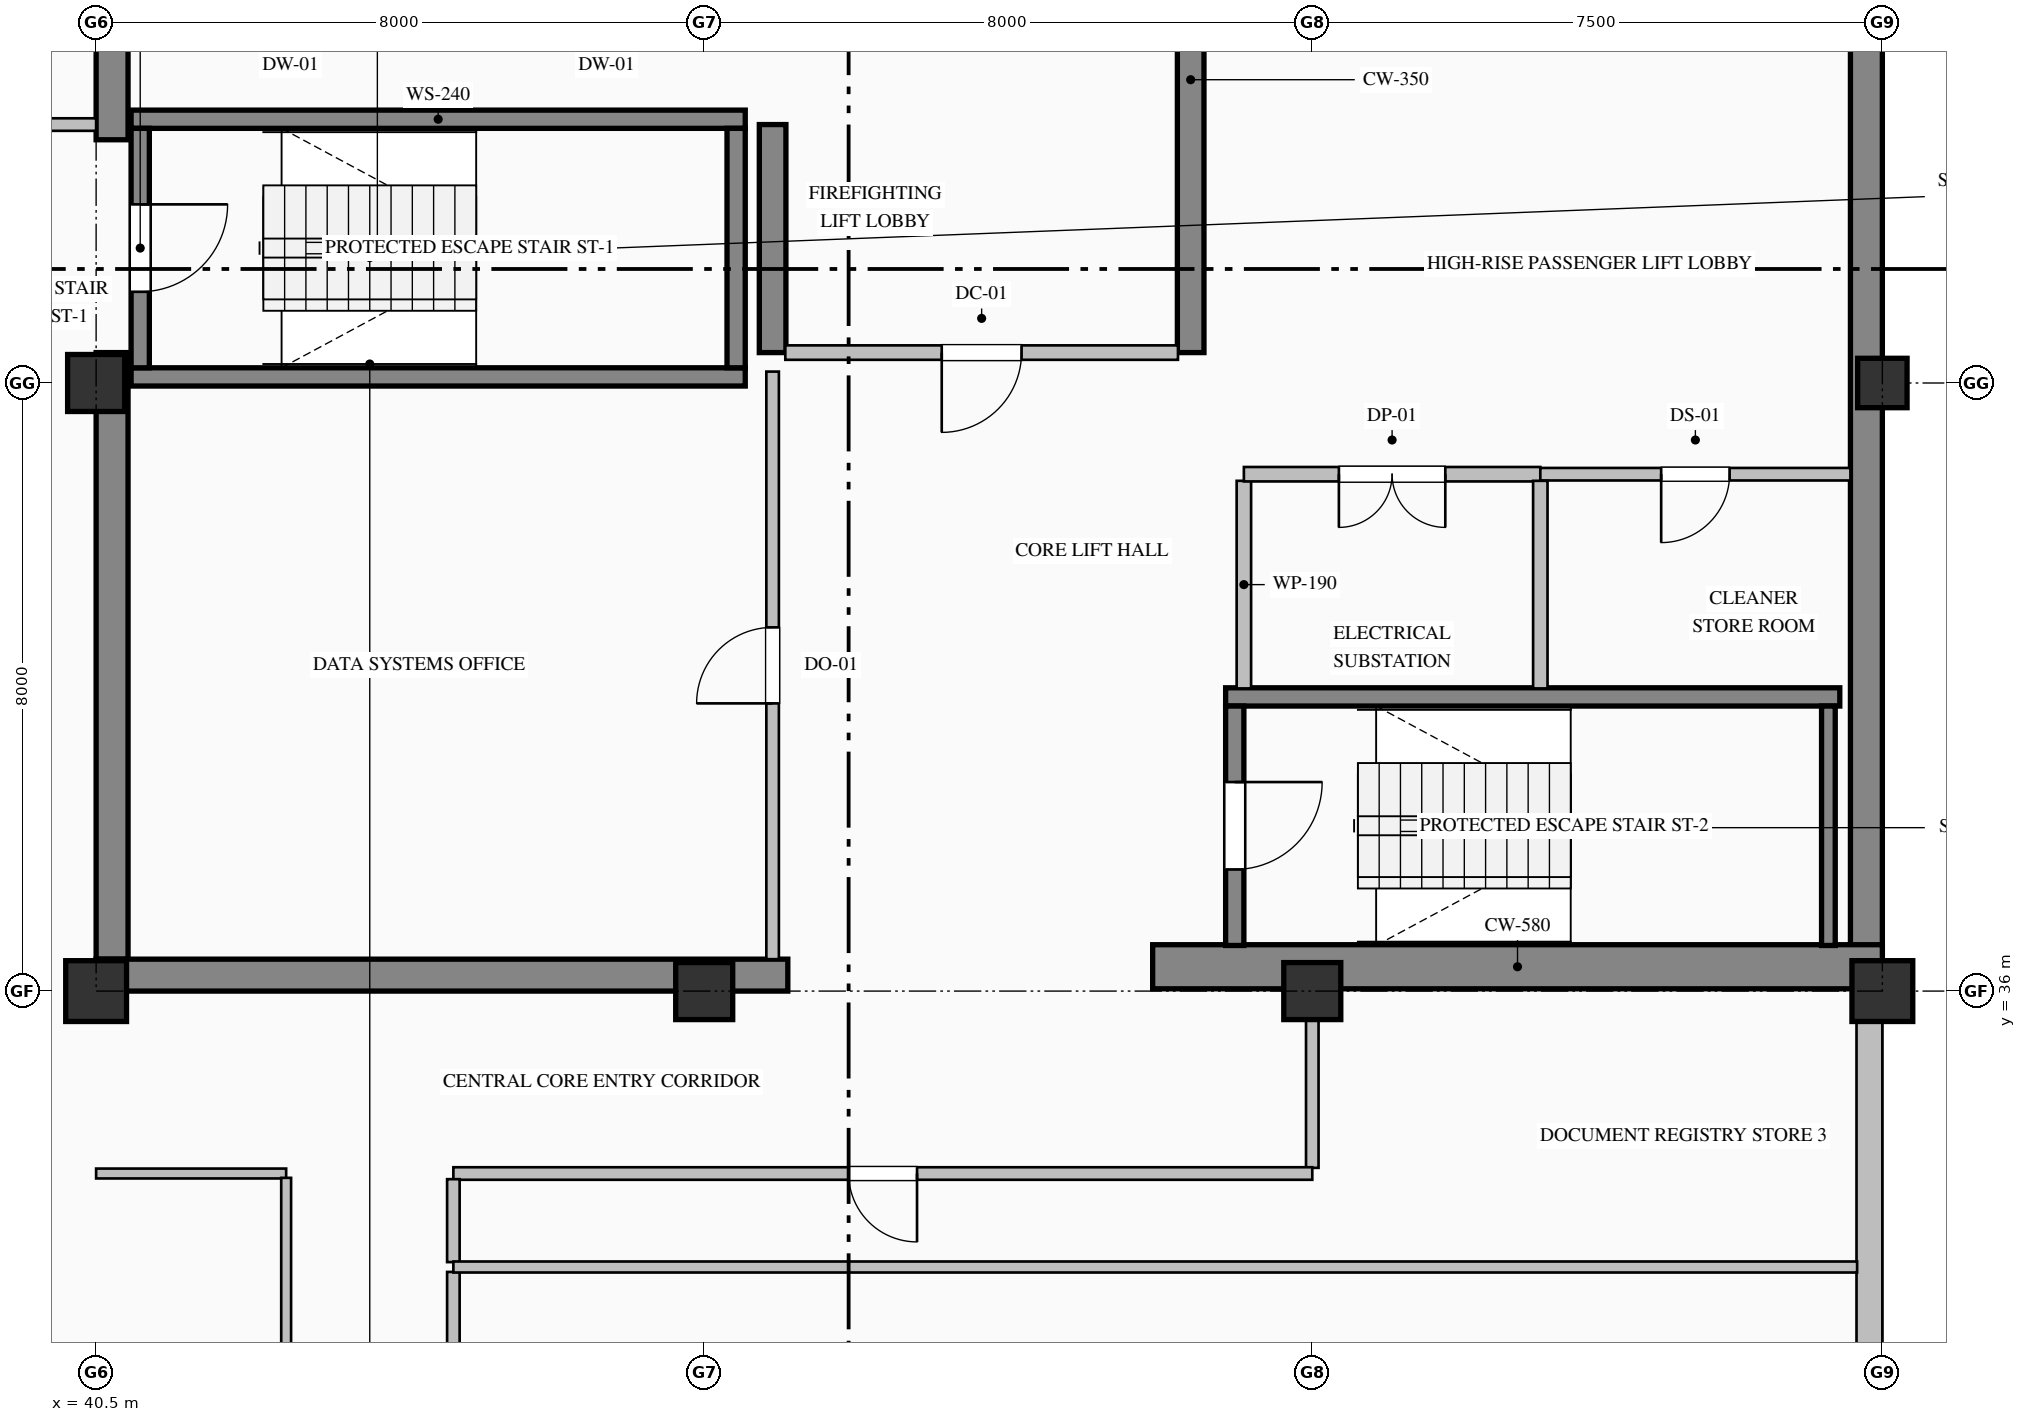
"""IFC4 building model, lengths in metres.
Left out: names, types, materials, properties, quantities, classifications, styles, units other than length and angle.
Written with IfcOpenShell. Run it as: python <this file> out.ifc"""

import sys

from ifc_helpers import new_model, si_unit, direction, frame, frame_2d, origin, origin_2d, place, context, subcontext, project, spatial, rectangle, hollow_rectangle, extrude, element, fill, save


model = new_model("IFC4")
c1 = context("Model", 3, precision=1e-05, world=origin(), true_north=direction((0.0, 1.0)))
c2 = subcontext(c1, "Body", "Model", "MODEL_VIEW")
j1 = project(units=[si_unit("LENGTHUNIT", "METRE"), si_unit("PLANEANGLEUNIT", "RADIAN")], contexts=[c1])
p1 = place(None, origin())
s1 = spatial("IfcSite", under=j1, at=p1, CompositionType="ELEMENT")
p2 = place(p1, origin())
s2 = spatial("IfcBuilding", under=s1, at=p2, CompositionType="ELEMENT")
p3 = place(p2, frame((0.0, 0.0, 363.2)))
s3 = spatial("IfcBuildingStorey", under=s2, at=p3, CompositionType="ELEMENT", Elevation=363.2)
p4 = place(p3, frame((63.79, 36.32, 0.0), z_axis=(0.0, 0.0, 1.0), x_axis=(0.0, 1.0, 0.0)))
e1 = element("IfcWall", 1, at=p4, inside=s3, PredefinedType="SHEAR", context=c2, shape_type="SweptSolid", body=[
    extrude(rectangle(XDim=15.26, YDim=0.42, at=frame_2d((7.63, 0.0))), origin(), (0.0, 0.0, 1.0), 3.58),
])
p5 = place(p3, frame((40.71, 36.42, 0.0), z_axis=(0.0, 0.0, 1.0), x_axis=(0.0, 1.0, 0.0)))
e2 = element("IfcWall", 2, at=p5, inside=s3, PredefinedType="SHEAR", context=c2, shape_type="SweptSolid", body=[
    extrude(rectangle(XDim=7.98, YDim=0.42, at=frame_2d((3.99, 0.0))), origin(), (0.0, 0.0, 1.0), 3.58),
])
p6 = place(p3, frame((40.71, 47.2, 0.0), z_axis=(0.0, 0.0, 1.0), x_axis=(0.0, 1.0, 0.0)))
e3 = element("IfcWall", 3, at=p6, inside=s3, PredefinedType="SHEAR", context=c2, shape_type="SweptSolid", body=[
    extrude(rectangle(XDim=4.38, YDim=0.42, at=frame_2d((2.19, 0.0))), origin(), (0.0, 0.0, 1.0), 3.58),
])
p7 = place(p3, frame((40.5, 36.21, 0.0), z_axis=(0.0, 0.0, 1.0), x_axis=(1.0, 0.0, 0.0)))
e4 = element("IfcWall", 4, at=p7, inside=s3, PredefinedType="SHEAR", context=c2, shape_type="SweptSolid", body=[
    extrude(rectangle(XDim=9.1, YDim=0.42, at=frame_2d((4.55, 0.0))), origin(), (0.0, 0.0, 1.0), 3.58),
])
p8 = place(p3, frame((54.4, 36.32, 0.0), z_axis=(0.0, 0.0, 1.0), x_axis=(1.0, 0.0, 0.0)))
e5 = element("IfcWall", 5, at=p8, inside=s3, PredefinedType="SHEAR", context=c2, shape_type="SweptSolid", body=[
    extrude(rectangle(XDim=9.6, YDim=0.58, at=frame_2d((4.8, 0.0))), origin(), (0.0, 0.0, 1.0), 4.0),
])
p9 = place(p3, frame((49.4, 44.4, 0.0), z_axis=(0.0, 0.0, 1.0), x_axis=(0.0, 1.0, 0.0)))
e6 = element("IfcWall", 6, at=p9, inside=s3, PredefinedType="SHEAR", context=c2, shape_type="SweptSolid", body=[
    extrude(rectangle(XDim=3.0, YDim=0.35, at=frame_2d((1.5, 0.0))), origin(), (0.0, 0.0, 1.0), 3.58),
])
p10 = place(p3, frame((54.9, 44.4, 0.0), z_axis=(0.0, 0.0, 1.0), x_axis=(0.0, 1.0, 0.0)))
e7 = element("IfcWall", 7, at=p10, inside=s3, PredefinedType="SHEAR", context=c2, shape_type="SweptSolid", body=[
    extrude(rectangle(XDim=7.18, YDim=0.35, at=frame_2d((3.59, 0.0))), origin(), (0.0, 0.0, 1.0), 3.58),
])
p11 = place(p3, frame((40.5, 36.0, 0.0), z_axis=(0.0, 0.0, 1.0), x_axis=(1.0, 0.0, 0.0)))
e8 = element("IfcColumn", 8, at=p11, inside=s3, PredefinedType="COLUMN", context=c2, shape_type="SweptSolid", body=[
    extrude(hollow_rectangle(XDim=0.8, YDim=0.8, WallThickness=0.032, at=origin_2d()), origin(), (0.0, 0.0, 1.0), 4.0),
])
for number, where, z_axis, x_axis in (
    (9, (40.5, 44.0, 0.0), (0.0, 0.0, 1.0), (1.0, 0.0, 0.0)),
    (10, (48.5, 36.0, 0.0), (0.0, 0.0, 1.0), (1.0, 0.0, 0.0)),
    (11, (56.5, 36.0, 0.0), (0.0, 0.0, 1.0), (1.0, 0.0, 0.0)),
):
    element("IfcColumn", number, at=place(p3, frame(where, z_axis=z_axis, x_axis=x_axis)), inside=s3, PredefinedType="COLUMN", context=c2, shape_type="SweptSolid", body=[
        extrude(rectangle(XDim=0.75, YDim=0.75, at=origin_2d()), origin(), (0.0, 0.0, 1.0), 4.0),
    ])
p12 = place(p3, frame((64.0, 36.0, 0.0), z_axis=(0.0, 0.0, 1.0), x_axis=(1.0, 0.0, 0.0)))
e12 = element("IfcColumn", 12, at=p12, inside=s3, PredefinedType="COLUMN", context=c2, shape_type="SweptSolid", body=[
    extrude(hollow_rectangle(XDim=0.8, YDim=0.8, WallThickness=0.032, at=origin_2d()), origin(), (0.0, 0.0, 1.0), 4.0),
])
p13 = place(p3, frame((64.0, 44.0, 0.0), z_axis=(0.0, 0.0, 1.0), x_axis=(1.0, 0.0, 0.0)))
e13 = element("IfcColumn", 13, at=p13, inside=s3, PredefinedType="COLUMN", context=c2, shape_type="SweptSolid", body=[
    extrude(hollow_rectangle(XDim=0.65, YDim=0.65, WallThickness=0.028, at=origin_2d()), origin(), (0.0, 0.0, 1.0), 4.0),
])
p14 = place(p3, frame((63.83, 36.05, 0.0), z_axis=(0.0, 0.0, 1.0), x_axis=(0.0, -1.0, 0.0)))
e14 = element("IfcWall", 14, at=p14, inside=s3, PredefinedType="SOLIDWALL", context=c2, shape_type="SweptSolid", body=[
    extrude(rectangle(XDim=13.55, YDim=0.34, at=frame_2d((6.775, 0.0))), origin(), (0.0, 0.0, 1.0), 3.13),
])
for number, where, z_axis, x_axis in (
    (15, (40.96, 47.47, 0.0), (0.0, 0.0, 1.0), (1.0, 0.0, 0.0)),
    (16, (49.04, 44.08, 0.0), (0.0, 0.0, 1.0), (-1.0, 0.0, 0.0)),
):
    element("IfcWall", number, at=place(p3, frame(where, z_axis=z_axis, x_axis=x_axis)), inside=s3, PredefinedType="SOLIDWALL", context=c2, shape_type="SweptSolid", body=[
        extrude(rectangle(XDim=8.08, YDim=0.24, at=frame_2d((4.04, 0.0))), origin(), (0.0, 0.0, 1.0), 4.0),
    ])
p15 = place(p3, frame((41.08, 47.35, 0.0), z_axis=(0.0, 0.0, 1.0), x_axis=(0.0, -1.0, 0.0)))
e17 = element("IfcWall", 17, at=p15, inside=s3, PredefinedType="SOLIDWALL", context=c2, shape_type="SweptSolid", body=[
    extrude(rectangle(XDim=3.15, YDim=0.24, at=frame_2d((1.575, 0.0))), origin(), (0.0, 0.0, 1.0), 4.0),
])
p16 = place(p15, frame((1.0, 0.0, 0.0)))
e18 = element("IfcOpeningElement", 18, at=p16, cuts=e17, PredefinedType="OPENING", context=c2, shape_type="SweptSolid", body=[
    extrude(rectangle(XDim=1.15, YDim=2.2, at=frame_2d((0.575, 1.1))), frame((0.0, 0.13, 0.0), z_axis=(0.0, -1.0, 0.0), x_axis=(1.0, 0.0, 0.0)), (0.0, 0.0, 1.0), 0.26),
])
p17 = place(p3, frame((48.92, 44.2, 0.0), z_axis=(0.0, 0.0, 1.0), x_axis=(0.0, 1.0, 0.0)))
e19 = element("IfcWall", 19, at=p17, inside=s3, PredefinedType="SOLIDWALL", context=c2, shape_type="SweptSolid", body=[
    extrude(rectangle(XDim=3.15, YDim=0.24, at=frame_2d((1.575, 0.0))), origin(), (0.0, 0.0, 1.0), 4.0),
])
p18 = place(p3, frame((55.36, 39.87, 0.0), z_axis=(0.0, 0.0, 1.0), x_axis=(1.0, 0.0, 0.0)))
e20 = element("IfcWall", 20, at=p18, inside=s3, PredefinedType="SOLIDWALL", context=c2, shape_type="SweptSolid", body=[
    extrude(rectangle(XDim=8.08, YDim=0.24, at=frame_2d((4.04, 0.0))), origin(), (0.0, 0.0, 1.0), 4.0),
])
p19 = place(p3, frame((55.48, 39.75, 0.0), z_axis=(0.0, 0.0, 1.0), x_axis=(0.0, -1.0, 0.0)))
e21 = element("IfcWall", 21, at=p19, inside=s3, PredefinedType="SOLIDWALL", context=c2, shape_type="SweptSolid", body=[
    extrude(rectangle(XDim=3.15, YDim=0.24, at=frame_2d((1.575, 0.0))), origin(), (0.0, 0.0, 1.0), 4.0),
])
p20 = place(p19, frame((1.0, 0.0, 0.0)))
e22 = element("IfcOpeningElement", 22, at=p20, cuts=e21, PredefinedType="OPENING", context=c2, shape_type="SweptSolid", body=[
    extrude(rectangle(XDim=1.15, YDim=2.2, at=frame_2d((0.575, 1.1))), frame((0.0, 0.13, 0.0), z_axis=(0.0, -1.0, 0.0), x_axis=(1.0, 0.0, 0.0)), (0.0, 0.0, 1.0), 0.26),
])
p21 = place(p3, frame((63.29, 36.6, 0.0), z_axis=(0.0, 0.0, 1.0), x_axis=(0.0, 1.0, 0.0)))
e23 = element("IfcWall", 23, at=p21, inside=s3, PredefinedType="SOLIDWALL", context=c2, shape_type="SweptSolid", body=[
    extrude(rectangle(XDim=3.15, YDim=0.18, at=frame_2d((1.575, 0.0))), origin(), (0.0, 0.0, 1.0), 4.0),
])
p22 = place(p3, frame((37.8, 47.4, 0.0), z_axis=(0.0, 0.0, 1.0), x_axis=(1.0, 0.0, 0.0)))
e24 = element("IfcWall", 24, at=p22, inside=s3, PredefinedType="PARTITIONING", context=c2, shape_type="SweptSolid", body=[
    extrude(rectangle(XDim=2.7, YDim=0.165, at=frame_2d((1.35, 0.0))), origin(), (0.0, 0.0, 1.0), 3.58),
])
p23 = place(p22, frame((0.825, 0.0, 0.0)))
e25 = element("IfcOpeningElement", 25, at=p23, cuts=e24, PredefinedType="OPENING", context=c2, shape_type="SweptSolid", body=[
    extrude(rectangle(XDim=1.05, YDim=2.15, at=frame_2d((0.525, 1.075))), frame((0.0, 0.093, 0.0), z_axis=(0.0, -1.0, 0.0), x_axis=(1.0, 0.0, 0.0)), (0.0, 0.0, 1.0), 0.185),
])
p24 = place(p3, frame((54.733, 44.4, 0.0), z_axis=(0.0, 0.0, 1.0), x_axis=(-1.0, 0.0, 0.0)))
e26 = element("IfcWall", 26, at=p24, inside=s3, PredefinedType="PARTITIONING", context=c2, shape_type="SweptSolid", body=[
    extrude(rectangle(XDim=5.166, YDim=0.19, at=frame_2d((2.583, 0.0))), origin(), (0.0, 0.0, 1.0), 3.58),
])
p25 = place(p24, frame((2.058, 0.0, 0.0)))
e27 = element("IfcOpeningElement", 27, at=p25, cuts=e26, PredefinedType="OPENING", context=c2, shape_type="SweptSolid", body=[
    extrude(rectangle(XDim=1.05, YDim=2.15, at=frame_2d((0.525, 1.075))), frame((0.0, 0.105, 0.0), z_axis=(0.0, -1.0, 0.0), x_axis=(1.0, 0.0, 0.0)), (0.0, 0.0, 1.0), 0.21),
])
p26 = place(p3, frame((49.4, 36.42, 0.0), z_axis=(0.0, 0.0, 1.0), x_axis=(0.0, 1.0, 0.0)))
e28 = element("IfcWall", 28, at=p26, inside=s3, PredefinedType="PARTITIONING", context=c2, shape_type="SweptSolid", body=[
    extrude(rectangle(XDim=7.73, YDim=0.165, at=frame_2d((3.865, 0.0))), origin(), (0.0, 0.0, 1.0), 2.822),
])
p27 = place(p26, frame((3.365, 0.0, 0.0)))
e29 = element("IfcOpeningElement", 29, at=p27, cuts=e28, PredefinedType="OPENING", context=c2, shape_type="SweptSolid", body=[
    extrude(rectangle(XDim=1.0, YDim=2.15, at=frame_2d((0.5, 1.075))), frame((0.0, 0.093, 0.0), z_axis=(0.0, -1.0, 0.0), x_axis=(1.0, 0.0, 0.0)), (0.0, 0.0, 1.0), 0.185),
])
p28 = place(p3, frame((55.6, 42.713, 0.0), z_axis=(0.0, 0.0, 1.0), x_axis=(0.0, -1.0, 0.0)))
e30 = element("IfcWall", 30, at=p28, inside=s3, PredefinedType="PARTITIONING", context=c2, shape_type="SweptSolid", body=[
    extrude(rectangle(XDim=2.731, YDim=0.19, at=frame_2d((1.365, 0.0))), origin(), (0.0, 0.0, 1.0), 3.58),
])
p29 = place(p3, frame((59.5, 42.8, 0.0), z_axis=(0.0, 0.0, 1.0), x_axis=(-1.0, 0.0, 0.0)))
e31 = element("IfcWall", 31, at=p29, inside=s3, PredefinedType="PARTITIONING", context=c2, shape_type="SweptSolid", body=[
    extrude(rectangle(XDim=3.9, YDim=0.19, at=frame_2d((1.95, 0.0))), origin(), (0.0, 0.0, 1.0), 3.58),
])
p30 = place(p29, frame((1.25, 0.0, 0.0)))
e32 = element("IfcOpeningElement", 32, at=p30, cuts=e31, PredefinedType="OPENING", context=c2, shape_type="SweptSolid", body=[
    extrude(rectangle(XDim=1.4, YDim=2.25, at=frame_2d((0.7, 1.125))), frame((0.0, 0.105, 0.0), z_axis=(0.0, -1.0, 0.0), x_axis=(1.0, 0.0, 0.0)), (0.0, 0.0, 1.0), 0.21),
])
p31 = place(p3, frame((63.58, 42.8, 0.0), z_axis=(0.0, 0.0, 1.0), x_axis=(-1.0, 0.0, 0.0)))
e33 = element("IfcWall", 33, at=p31, inside=s3, PredefinedType="PARTITIONING", context=c2, shape_type="SweptSolid", body=[
    extrude(rectangle(XDim=4.08, YDim=0.165, at=frame_2d((2.04, 0.0))), origin(), (0.0, 0.0, 1.0), 3.58),
])
p32 = place(p31, frame((1.59, 0.0, 0.0)))
e34 = element("IfcOpeningElement", 34, at=p32, cuts=e33, PredefinedType="OPENING", context=c2, shape_type="SweptSolid", body=[
    extrude(rectangle(XDim=0.9, YDim=2.15, at=frame_2d((0.45, 1.075))), frame((0.0, 0.093, 0.0), z_axis=(0.0, -1.0, 0.0), x_axis=(1.0, 0.0, 0.0)), (0.0, 0.0, 1.0), 0.185),
])
p33 = place(p3, frame((59.5, 42.713, 0.0), z_axis=(0.0, 0.0, 1.0), x_axis=(0.0, -1.0, 0.0)))
e35 = element("IfcWall", 35, at=p33, inside=s3, PredefinedType="PARTITIONING", context=c2, shape_type="SweptSolid", body=[
    extrude(rectangle(XDim=2.731, YDim=0.19, at=frame_2d((1.365, 0.0))), origin(), (0.0, 0.0, 1.0), 3.58),
])
p34 = place(p3, frame((56.5, 36.0, 0.0), z_axis=(0.0, 0.0, 1.0), x_axis=(0.0, -1.0, 0.0)))
e36 = element("IfcWall", 36, at=p34, inside=s3, PredefinedType="PARTITIONING", context=c2, shape_type="SweptSolid", body=[
    extrude(rectangle(XDim=2.325, YDim=0.165, at=frame_2d((1.163, 0.0))), origin(), (0.0, 0.0, 1.0), 2.972),
])
p35 = place(p3, frame((56.5, 33.6, 0.0), z_axis=(0.0, 0.0, 1.0), x_axis=(-1.0, 0.0, 0.0)))
e37 = element("IfcWall", 37, at=p35, inside=s3, PredefinedType="PARTITIONING", context=c2, shape_type="SweptSolid", body=[
    extrude(rectangle(XDim=11.3, YDim=0.165, at=frame_2d((5.65, 0.0))), origin(), (0.0, 0.0, 1.0), 3.58),
])
p36 = place(p35, frame((5.2, 0.0, 0.0)))
e38 = element("IfcOpeningElement", 38, at=p36, cuts=e37, PredefinedType="OPENING", context=c2, shape_type="SweptSolid", body=[
    extrude(rectangle(XDim=0.9, YDim=2.15, at=frame_2d((0.45, 1.075))), frame((0.0, 0.093, 0.0), z_axis=(0.0, -1.0, 0.0), x_axis=(1.0, 0.0, 0.0)), (0.0, 0.0, 1.0), 0.185),
])
p37 = place(p3, frame((43.0, 33.6, 0.0), z_axis=(0.0, 0.0, 1.0), x_axis=(-1.0, 0.0, 0.0)))
e39 = element("IfcWall", 39, at=p37, inside=s3, PredefinedType="PARTITIONING", context=c2, shape_type="SweptSolid", body=[
    extrude(rectangle(XDim=2.5, YDim=0.13, at=frame_2d((1.25, 0.0))), origin(), (0.0, 0.0, 1.0), 3.58),
])
p38 = place(p3, frame((45.2, 32.305, 0.0), z_axis=(0.0, 0.0, 1.0), x_axis=(0.0, -1.0, 0.0)))
e40 = element("IfcWall", 40, at=p38, inside=s3, PredefinedType="PARTITIONING", context=c2, shape_type="SweptSolid", body=[
    extrude(rectangle(XDim=3.501, YDim=0.165, at=frame_2d((1.75, 0.0))), origin(), (0.0, 0.0, 1.0), 3.58),
])
p39 = place(p38, frame((1.301, 0.0, 0.0)))
e41 = element("IfcOpeningElement", 41, at=p39, cuts=e40, PredefinedType="OPENING", context=c2, shape_type="SweptSolid", body=[
    extrude(rectangle(XDim=0.9, YDim=2.15, at=frame_2d((0.45, 1.075))), frame((0.0, 0.093, 0.0), z_axis=(0.0, -1.0, 0.0), x_axis=(1.0, 0.0, 0.0)), (0.0, 0.0, 1.0), 0.185),
])
p40 = place(p3, frame((45.2, 33.525, 0.0), z_axis=(0.0, 0.0, 1.0), x_axis=(0.0, -1.0, 0.0)))
e42 = element("IfcWall", 42, at=p40, inside=s3, PredefinedType="PARTITIONING", context=c2, shape_type="SweptSolid", body=[
    extrude(rectangle(XDim=1.091, YDim=0.165, at=frame_2d((0.545, 0.0))), origin(), (0.0, 0.0, 1.0), 3.58),
])
p41 = place(p3, frame((43.0, 22.875, 0.0), z_axis=(0.0, 0.0, 1.0), x_axis=(0.0, 1.0, 0.0)))
e43 = element("IfcWall", 43, at=p41, inside=s3, PredefinedType="PARTITIONING", context=c2, shape_type="SweptSolid", body=[
    extrude(rectangle(XDim=10.668, YDim=0.13, at=frame_2d((5.334, 0.0))), origin(), (0.0, 0.0, 1.0), 3.58),
])
p42 = place(p41, frame((4.834, 0.0, 0.0)))
e44 = element("IfcOpeningElement", 44, at=p42, cuts=e43, PredefinedType="OPENING", context=c2, shape_type="SweptSolid", body=[
    extrude(rectangle(XDim=1.0, YDim=2.15, at=frame_2d((0.5, 1.075))), frame((0.0, 0.075, 0.0), z_axis=(0.0, -1.0, 0.0), x_axis=(1.0, 0.0, 0.0)), (0.0, 0.0, 1.0), 0.15),
])
p43 = place(p3, frame((45.2, 32.37, 0.0), z_axis=(0.0, 0.0, 1.0), x_axis=(1.0, 0.0, 0.0)))
e45 = element("IfcWall", 45, at=p43, inside=s3, PredefinedType="PARTITIONING", context=c2, shape_type="SweptSolid", body=[
    extrude(rectangle(XDim=18.468, YDim=0.145, at=frame_2d((9.234, 0.0))), origin(), (0.0, 0.0, 1.0), 3.58),
])
p44 = place(p16, origin())
e46 = element("IfcDoor", 46, at=p44, inside=s3, OperationType="SINGLE_SWING_LEFT", PredefinedType="DOOR", context=c2, shape_type="SweptSolid", body=[
    extrude(rectangle(XDim=1.15, YDim=2.2, at=frame_2d((0.575, 1.1))), frame((0.0, 0.025, 0.0), z_axis=(0.0, -1.0, 0.0), x_axis=(1.0, 0.0, 0.0)), (0.0, 0.0, 1.0), 0.05),
])
fill(e18, e46)
p45 = place(p20, origin())
e47 = element("IfcDoor", 47, at=p45, inside=s3, OperationType="SINGLE_SWING_LEFT", PredefinedType="DOOR", context=c2, shape_type="SweptSolid", body=[
    extrude(rectangle(XDim=1.15, YDim=2.2, at=frame_2d((0.575, 1.1))), frame((0.0, 0.025, 0.0), z_axis=(0.0, -1.0, 0.0), x_axis=(1.0, 0.0, 0.0)), (0.0, 0.0, 1.0), 0.05),
])
fill(e22, e47)
p46 = place(p25, origin())
e48 = element("IfcDoor", 48, at=p46, inside=s3, OperationType="SINGLE_SWING_RIGHT", PredefinedType="DOOR", context=c2, shape_type="SweptSolid", body=[
    extrude(rectangle(XDim=1.05, YDim=2.15, at=frame_2d((0.525, 1.075))), frame((0.0, 0.025, 0.0), z_axis=(0.0, -1.0, 0.0), x_axis=(1.0, 0.0, 0.0)), (0.0, 0.0, 1.0), 0.05),
])
fill(e27, e48)
p47 = place(p27, origin())
e49 = element("IfcDoor", 49, at=p47, inside=s3, OperationType="SINGLE_SWING_LEFT", PredefinedType="DOOR", context=c2, shape_type="SweptSolid", body=[
    extrude(rectangle(XDim=1.0, YDim=2.15, at=frame_2d((0.5, 1.075))), frame((0.0, 0.025, 0.0), z_axis=(0.0, -1.0, 0.0), x_axis=(1.0, 0.0, 0.0)), (0.0, 0.0, 1.0), 0.05),
])
fill(e29, e49)
p48 = place(p30, origin())
e50 = element("IfcDoor", 50, at=p48, inside=s3, OperationType="DOUBLE_DOOR_SINGLE_SWING", PredefinedType="DOOR", context=c2, shape_type="SweptSolid", body=[
    extrude(rectangle(XDim=1.4, YDim=2.25, at=frame_2d((0.7, 1.125))), frame((0.0, 0.025, 0.0), z_axis=(0.0, -1.0, 0.0), x_axis=(1.0, 0.0, 0.0)), (0.0, 0.0, 1.0), 0.05),
])
fill(e32, e50)
p49 = place(p32, origin())
e51 = element("IfcDoor", 51, at=p49, inside=s3, OperationType="SINGLE_SWING_RIGHT", PredefinedType="DOOR", context=c2, shape_type="SweptSolid", body=[
    extrude(rectangle(XDim=0.9, YDim=2.15, at=frame_2d((0.45, 1.075))), frame((0.0, 0.025, 0.0), z_axis=(0.0, -1.0, 0.0), x_axis=(1.0, 0.0, 0.0)), (0.0, 0.0, 1.0), 0.05),
])
fill(e34, e51)
p50 = place(p36, origin())
e52 = element("IfcDoor", 52, at=p50, inside=s3, OperationType="SINGLE_SWING_LEFT", PredefinedType="DOOR", context=c2, shape_type="SweptSolid", body=[
    extrude(rectangle(XDim=0.9, YDim=2.15, at=frame_2d((0.45, 1.075))), frame((0.0, 0.025, 0.0), z_axis=(0.0, -1.0, 0.0), x_axis=(1.0, 0.0, 0.0)), (0.0, 0.0, 1.0), 0.05),
])
fill(e38, e52)
save(model, sys.argv[1])
